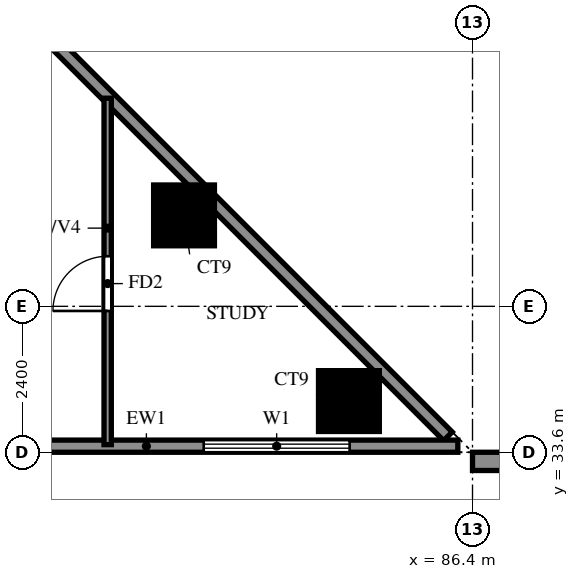
"""IFC4 building model, lengths in metres.
Left out: names, types, materials, properties, quantities, classifications, styles, units other than length and angle.
Written with IfcOpenShell. Run it as: python <this file> out.ifc"""

import sys

from ifc_helpers import new_model, si_unit, direction, frame, frame_2d, origin, origin_2d, place, context, subcontext, project, spatial, rectangle, extrude, source, transform, mapped, element, fill, save


model = new_model("IFC4")
c1 = context("Model", 3, precision=1e-05, world=origin(), true_north=direction((0.0, 1.0)))
c2 = subcontext(c1, "Body", "Model", "MODEL_VIEW")
j1 = project(units=[si_unit("LENGTHUNIT", "METRE"), si_unit("PLANEANGLEUNIT", "RADIAN")], contexts=[c1])
p1 = place(None, origin())
s1 = spatial("IfcSite", under=j1, at=p1, CompositionType="ELEMENT")
p2 = place(p1, origin())
s2 = spatial("IfcBuilding", under=s1, at=p2, CompositionType="ELEMENT")
p3 = place(p2, frame((0.0, 0.0, 72.5)))
s3 = spatial("IfcBuildingStorey", under=s2, at=p3, CompositionType="ELEMENT", Elevation=72.5)
m1 = source(origin(), c2, "Body", "SweptSolid", [
    extrude(rectangle(XDim=1.0, YDim=1.0, at=origin_2d()), origin(), (0.0, 0.0, 1.0), 3.18),
])
for number, where, z_axis, x_axis in (
    (1, (84.367, 34.442, 0.0), (0.0, 0.0, 1.0), (1.0, 0.0, 0.0)),
    (2, (81.656, 37.496, 0.0), (0.0, 0.0, 1.0), (1.0, 0.0, 0.0)),
):
    element("IfcColumn", number, at=place(p3, frame(where, z_axis=z_axis, x_axis=x_axis)), inside=s3, PredefinedType="COLUMN", context=c2, shape_type="MappedRepresentation", body=[
        mapped(m1, transform((0.0, 0.0, 0.0))),
    ])
p4 = place(p3, frame((85.996, 33.863, 0.0), z_axis=(0.0, 0.0, 1.0), x_axis=(-0.707100718496, 0.707112843825, 0.0)))
e3 = element("IfcWall", 3, at=p4, inside=s3, PredefinedType="SOLIDWALL", context=c2, shape_type="SweptSolid", body=[
    extrude(rectangle(XDim=20.135, YDim=0.2, at=frame_2d((10.067, 0.0))), origin(), (0.0, 0.0, 1.0), 3.18),
])
p5 = place(p3, frame((72.5, 33.7, 0.0), z_axis=(0.0, 0.0, 1.0), x_axis=(1.0, 0.0, 0.0)))
e4 = element("IfcWall", 4, at=p5, inside=s3, PredefinedType="SOLIDWALL", context=c2, shape_type="SweptSolid", body=[
    extrude(rectangle(XDim=13.659, YDim=0.2, at=frame_2d((6.829, 0.0))), origin(), (0.0, 0.0, 1.0), 3.18),
])
p6 = place(p5, frame((1.2, 0.0, 0.6)))
e5 = element("IfcOpeningElement", 5, at=p6, cuts=e4, PredefinedType="OPENING", context=c2, shape_type="SweptSolid", body=[
    extrude(rectangle(XDim=2.4, YDim=2.4, at=frame_2d((1.2, 1.2))), frame((0.0, 0.11, 0.0), z_axis=(0.0, -1.0, 0.0), x_axis=(1.0, 0.0, 0.0)), (0.0, 0.0, 1.0), 0.22),
])
p7 = place(p5, frame((4.5, 0.0, 0.6)))
e6 = element("IfcOpeningElement", 6, at=p7, cuts=e4, PredefinedType="OPENING", context=c2, shape_type="SweptSolid", body=[
    extrude(rectangle(XDim=2.4, YDim=2.4, at=frame_2d((1.2, 1.2))), frame((0.0, 0.11, 0.0), z_axis=(0.0, -1.0, 0.0), x_axis=(1.0, 0.0, 0.0)), (0.0, 0.0, 1.0), 0.22),
])
p8 = place(p5, frame((9.479, 0.0, 0.6)))
e7 = element("IfcOpeningElement", 7, at=p8, cuts=e4, PredefinedType="OPENING", context=c2, shape_type="SweptSolid", body=[
    extrude(rectangle(XDim=2.4, YDim=2.4, at=frame_2d((1.2, 1.2))), frame((0.0, 0.11, 0.0), z_axis=(0.0, -1.0, 0.0), x_axis=(1.0, 0.0, 0.0)), (0.0, 0.0, 1.0), 0.22),
])
p9 = place(p3, frame((86.4, 33.45, -0.32), z_axis=(0.0, 0.0, 1.0), x_axis=(1.0, 0.0, 0.0)))
e8 = element("IfcWall", 8, at=p9, inside=s3, PredefinedType="SOLIDWALL", context=c2, shape_type="SweptSolid", body=[
    extrude(rectangle(XDim=2.4, YDim=0.3, at=frame_2d((1.2, 0.0))), origin(), (0.0, 0.0, 1.0), 3.5),
])
p10 = place(p3, frame((80.4, 33.725, 0.0), z_axis=(0.0, 0.0, 1.0), x_axis=(0.0, 1.0, 0.0)))
e9 = element("IfcWall", 9, at=p10, inside=s3, PredefinedType="PARTITIONING", context=c2, shape_type="SweptSolid", body=[
    extrude(rectangle(XDim=5.698, YDim=0.12, at=frame_2d((2.849, 0.0))), origin(), (0.0, 0.0, 1.0), 2.28),
])
p11 = place(p10, frame((2.199, 0.0, 0.0)))
e10 = element("IfcOpeningElement", 10, at=p11, cuts=e9, PredefinedType="OPENING", context=c2, shape_type="SweptSolid", body=[
    extrude(rectangle(XDim=0.9, YDim=2.1, at=frame_2d((0.45, 1.05))), frame((0.0, 0.07, 0.0), z_axis=(0.0, -1.0, 0.0), x_axis=(1.0, 0.0, 0.0)), (0.0, 0.0, 1.0), 0.14),
])
p12 = place(p8, origin())
e11 = element("IfcWindow", 11, at=p12, inside=s3, PartitioningType="DOUBLE_PANEL_VERTICAL", PredefinedType="WINDOW", context=c2, shape_type="SweptSolid", body=[
    extrude(rectangle(XDim=2.4, YDim=2.4, at=frame_2d((1.2, 1.2))), frame((0.0, 0.03, 0.0), z_axis=(0.0, -1.0, 0.0), x_axis=(1.0, 0.0, 0.0)), (0.0, 0.0, 1.0), 0.06),
])
fill(e7, e11)
p13 = place(p11, origin())
e12 = element("IfcDoor", 12, at=p13, inside=s3, OperationType="SINGLE_SWING_RIGHT", PredefinedType="DOOR", context=c2, shape_type="SweptSolid", body=[
    extrude(rectangle(XDim=0.9, YDim=2.1, at=frame_2d((0.45, 1.05))), frame((0.0, 0.025, 0.0), z_axis=(0.0, -1.0, 0.0), x_axis=(1.0, 0.0, 0.0)), (0.0, 0.0, 1.0), 0.05),
])
fill(e10, e12)
save(model, sys.argv[1])
